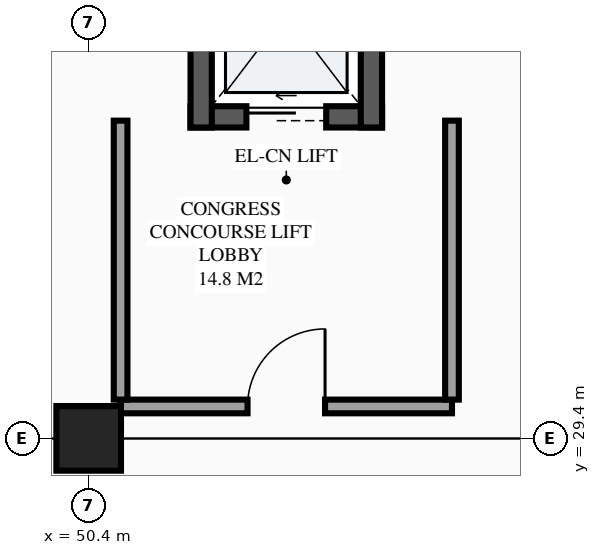
"""IFC4 building model, lengths in metres.
Left out: names, types, materials, properties, quantities, classifications, styles, units other than length and angle.
Written with IfcOpenShell. Run it as: python <this file> out.ifc"""

import sys

from ifc_helpers import new_model, si_unit, direction, frame, frame_2d, origin, origin_2d, place, context, subcontext, project, spatial, rectangle, extrude, element, fill, save


model = new_model("IFC4")
c1 = context("Model", 3, precision=1e-05, world=origin(), true_north=direction((0.0, 1.0)))
c2 = subcontext(c1, "Body", "Model", "MODEL_VIEW")
j1 = project(units=[si_unit("LENGTHUNIT", "METRE"), si_unit("PLANEANGLEUNIT", "RADIAN")], contexts=[c1])
p1 = place(None, origin())
s1 = spatial("IfcSite", under=j1, at=p1, CompositionType="ELEMENT")
p2 = place(p1, origin())
s2 = spatial("IfcBuilding", under=s1, at=p2, CompositionType="ELEMENT")
p3 = place(p2, origin())
s3 = spatial("IfcBuildingStorey", under=s2, at=p3, CompositionType="ELEMENT", Elevation=0.0)
p4 = place(p3, frame((50.4, 29.4, 0.0), z_axis=(0.0, 0.0, 1.0), x_axis=(1.0, 0.0, 0.0)))
e1 = element("IfcColumn", 1, at=p4, inside=s3, PredefinedType="COLUMN", context=c2, shape_type="SweptSolid", body=[
    extrude(rectangle(XDim=0.85, YDim=0.85, at=origin_2d()), origin(), (0.0, 0.0, 1.0), 5.4),
])
p5 = place(p3, frame((51.74, 33.63, 0.0), z_axis=(0.0, 0.0, 1.0), x_axis=(1.0, 0.0, 0.0)))
e2 = element("IfcWall", 2, at=p5, inside=s3, PredefinedType="SHEAR", context=c2, shape_type="SweptSolid", body=[
    extrude(rectangle(XDim=2.52, YDim=0.28, at=frame_2d((1.26, 0.0))), origin(), (0.0, 0.0, 1.0), 5.4),
])
p6 = place(p5, frame((0.735, 0.0, 0.0)))
e3 = element("IfcOpeningElement", 3, at=p6, cuts=e2, PredefinedType="OPENING", context=c2, shape_type="SweptSolid", body=[
    extrude(rectangle(XDim=1.05, YDim=2.2, at=frame_2d((0.525, 1.1))), frame((0.0, 0.15, 0.0), z_axis=(0.0, -1.0, 0.0), x_axis=(1.0, 0.0, 0.0)), (0.0, 0.0, 1.0), 0.3),
])
for number, where, z_axis, x_axis in (
    (4, (54.12, 33.49, 0.0), (0.0, 0.0, 1.0), (0.0, 1.0, 0.0)),
    (5, (51.88, 36.51, 0.0), (0.0, 0.0, 1.0), (0.0, -1.0, 0.0)),
):
    element("IfcWall", number, at=place(p3, frame(where, z_axis=z_axis, x_axis=x_axis)), inside=s3, PredefinedType="SHEAR", context=c2, shape_type="SweptSolid", body=[
        extrude(rectangle(XDim=3.02, YDim=0.28, at=frame_2d((1.51, 0.0))), origin(), (0.0, 0.0, 1.0), 5.4),
    ])
p7 = place(p3, frame((50.82, 29.82, 0.0), z_axis=(0.0, 0.0, 1.0), x_axis=(1.0, 0.0, 0.0)))
e6 = element("IfcWall", 6, at=p7, inside=s3, PredefinedType="PARTITIONING", context=c2, shape_type="SweptSolid", body=[
    extrude(rectangle(XDim=4.36, YDim=0.18, at=frame_2d((2.18, 0.0))), origin(), (0.0, 0.0, 1.0), 5.135),
])
p8 = place(p7, frame((1.67, 0.0, 0.0)))
e7 = element("IfcOpeningElement", 7, at=p8, cuts=e6, PredefinedType="OPENING", context=c2, shape_type="SweptSolid", body=[
    extrude(rectangle(XDim=1.02, YDim=2.15, at=frame_2d((0.51, 1.075))), frame((0.0, 0.1, 0.0), z_axis=(0.0, -1.0, 0.0), x_axis=(1.0, 0.0, 0.0)), (0.0, 0.0, 1.0), 0.2),
])
for number, where, z_axis, x_axis in (
    (8, (50.82, 29.91, 0.0), (0.0, 0.0, 1.0), (0.0, 1.0, 0.0)),
    (9, (55.18, 29.91, 0.0), (0.0, 0.0, 1.0), (0.0, 1.0, 0.0)),
):
    element("IfcWall", number, at=place(p3, frame(where, z_axis=z_axis, x_axis=x_axis)), inside=s3, PredefinedType="PARTITIONING", context=c2, shape_type="SweptSolid", body=[
        extrude(rectangle(XDim=3.67, YDim=0.18, at=frame_2d((1.835, 0.0))), origin(), (0.0, 0.0, 1.0), 5.135),
    ])
p9 = place(p6, origin())
e10 = element("IfcDoor", 10, at=p9, inside=s3, OperationType="SLIDING_TO_LEFT", PredefinedType="DOOR", context=c2, shape_type="SweptSolid", body=[
    extrude(rectangle(XDim=1.05, YDim=2.2, at=frame_2d((0.525, 1.1))), frame((0.0, 0.025, 0.0), z_axis=(0.0, -1.0, 0.0), x_axis=(1.0, 0.0, 0.0)), (0.0, 0.0, 1.0), 0.05),
])
fill(e3, e10)
p10 = place(p8, origin())
e11 = element("IfcDoor", 11, at=p10, inside=s3, OperationType="SINGLE_SWING_RIGHT", PredefinedType="DOOR", context=c2, shape_type="SweptSolid", body=[
    extrude(rectangle(XDim=1.02, YDim=2.15, at=frame_2d((0.51, 1.075))), frame((0.0, 0.025, 0.0), z_axis=(0.0, -1.0, 0.0), x_axis=(1.0, 0.0, 0.0)), (0.0, 0.0, 1.0), 0.05),
])
fill(e7, e11)
save(model, sys.argv[1])
